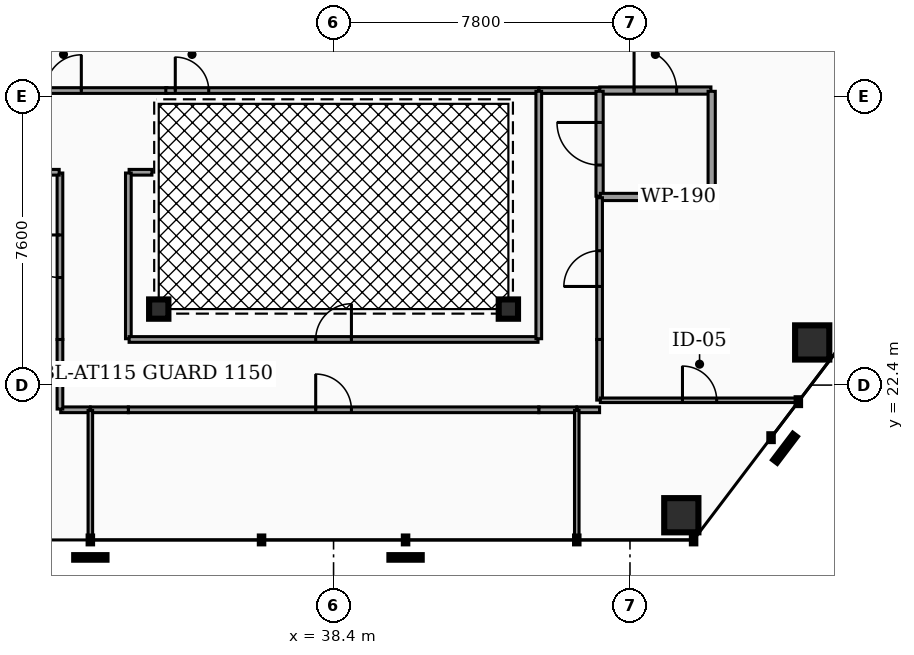
"""IFC4 building model, lengths in metres.
Left out: names, types, materials, properties, quantities, classifications, styles, units other than length and angle.
Written with IfcOpenShell. Run it as: python <this file> out.ifc"""

import sys

from ifc_helpers import new_model, si_unit, direction, frame, frame_2d, origin, origin_2d, place, context, subcontext, project, spatial, rectangle, hollow_rectangle, hollow_circle, extrude, element, fill, save


model = new_model("IFC4")
c1 = context("Model", 3, precision=1e-05, world=origin(), true_north=direction((0.0, 1.0)))
c2 = subcontext(c1, "Body", "Model", "MODEL_VIEW")
j1 = project(units=[si_unit("LENGTHUNIT", "METRE"), si_unit("PLANEANGLEUNIT", "RADIAN")], contexts=[c1])
p1 = place(None, origin())
s1 = spatial("IfcSite", under=j1, at=p1, CompositionType="ELEMENT")
p2 = place(p1, origin())
s2 = spatial("IfcBuilding", under=s1, at=p2, CompositionType="ELEMENT")
p3 = place(p2, frame((0.0, 0.0, 100.98)))
s3 = spatial("IfcBuildingStorey", under=s2, at=p3, CompositionType="ELEMENT", Elevation=100.98)
for number, where, z_axis, x_axis in (
    (1, (47.551, 18.976, 0.0), (0.0, 0.0, 1.0), (1.0, 0.0, 0.0)),
    (2, (50.995, 23.522, 0.0), (0.0, 0.0, 1.0), (1.0, 0.0, 0.0)),
):
    element("IfcColumn", number, at=place(p3, frame(where, z_axis=z_axis, x_axis=x_axis)), inside=s3, PredefinedType="COLUMN", context=c2, shape_type="SweptSolid", body=[
        extrude(hollow_rectangle(XDim=0.9, YDim=0.9, WallThickness=0.045, at=origin_2d()), origin(), (0.0, 0.0, 1.0), 3.82),
    ])
for number, where, z_axis, x_axis in (
    (3, (33.8, 24.4, 0.0), (0.0, 0.0, 1.0), (1.0, 0.0, 0.0)),
    (4, (43.0, 24.4, 0.0), (0.0, 0.0, 1.0), (1.0, 0.0, 0.0)),
):
    element("IfcColumn", number, at=place(p3, frame(where, z_axis=z_axis, x_axis=x_axis)), inside=s3, PredefinedType="COLUMN", context=c2, shape_type="SweptSolid", body=[
        extrude(hollow_circle(Radius=0.254, WallThickness=0.02, at=origin_2d()), origin(), (0.0, 0.0, 1.0), 3.82),
    ])
p4 = place(p3, frame((45.405, 30.15, 0.0), z_axis=(0.0, 0.0, 1.0), x_axis=(1.0, 0.0, 0.0)))
e5 = element("IfcWall", 5, at=p4, inside=s3, PredefinedType="PARTITIONING", context=c2, shape_type="SweptSolid", body=[
    extrude(rectangle(XDim=2.925, YDim=0.19, at=frame_2d((1.462, 0.0))), origin(), (0.0, 0.0, 1.0), 2.777),
])
p5 = place(p4, frame((0.903, 0.0, 0.0)))
e6 = element("IfcOpeningElement", 6, at=p5, cuts=e5, PredefinedType="OPENING", context=c2, shape_type="SweptSolid", body=[
    extrude(rectangle(XDim=1.12, YDim=2.05, at=frame_2d((0.56, 1.025))), frame((0.0, 0.105, 0.0), z_axis=(0.0, -1.0, 0.0), x_axis=(1.0, 0.0, 0.0)), (0.0, 0.0, 1.0), 0.21),
])
p6 = place(p3, frame((43.805, 30.15, 0.0), z_axis=(0.0, 0.0, 1.0), x_axis=(1.0, 0.0, 0.0)))
e7 = element("IfcWall", 7, at=p6, inside=s3, PredefinedType="PARTITIONING", context=c2, shape_type="SweptSolid", body=[
    extrude(rectangle(XDim=1.59, YDim=0.15, at=frame_2d((0.795, 0.0))), origin(), (0.0, 0.0, 1.0), 2.777),
])
p7 = place(p3, frame((28.57, 30.15, 0.0), z_axis=(0.0, 0.0, 1.0), x_axis=(1.0, 0.0, 0.0)))
e8 = element("IfcWall", 8, at=p7, inside=s3, PredefinedType="PARTITIONING", context=c2, shape_type="SweptSolid", body=[
    extrude(rectangle(XDim=5.445, YDim=0.15, at=frame_2d((2.722, 0.0))), origin(), (0.0, 0.0, 1.0), 2.777),
])
p8 = place(p7, frame((2.252, 0.0, 0.0)))
e9 = element("IfcOpeningElement", 9, at=p8, cuts=e8, PredefinedType="OPENING", context=c2, shape_type="SweptSolid", body=[
    extrude(rectangle(XDim=0.94, YDim=2.05, at=frame_2d((0.47, 1.025))), frame((0.0, 0.085, 0.0), z_axis=(0.0, -1.0, 0.0), x_axis=(1.0, 0.0, 0.0)), (0.0, 0.0, 1.0), 0.17),
])
p9 = place(p3, frame((33.985, 30.15, 0.0), z_axis=(0.0, 0.0, 1.0), x_axis=(1.0, 0.0, 0.0)))
e10 = element("IfcWall", 10, at=p9, inside=s3, PredefinedType="PARTITIONING", context=c2, shape_type="SweptSolid", body=[
    extrude(rectangle(XDim=9.81, YDim=0.15, at=frame_2d((4.905, 0.0))), origin(), (0.0, 0.0, 1.0), 2.777),
])
p10 = place(p9, frame((0.25, 0.0, 0.0)))
e11 = element("IfcOpeningElement", 11, at=p10, cuts=e10, PredefinedType="OPENING", context=c2, shape_type="SweptSolid", body=[
    extrude(rectangle(XDim=0.88, YDim=2.05, at=frame_2d((0.44, 1.025))), frame((0.0, 0.085, 0.0), z_axis=(0.0, -1.0, 0.0), x_axis=(1.0, 0.0, 0.0)), (0.0, 0.0, 1.0), 0.17),
])
p11 = place(p3, frame((45.4, 27.37, 0.0), z_axis=(0.0, 0.0, 1.0), x_axis=(0.0, 1.0, 0.0)))
e12 = element("IfcWall", 12, at=p11, inside=s3, PredefinedType="PARTITIONING", context=c2, shape_type="SweptSolid", body=[
    extrude(rectangle(XDim=2.76, YDim=0.19, at=frame_2d((1.38, 0.0))), origin(), (0.0, 0.0, 1.0), 2.777),
])
p12 = place(p11, frame((0.82, 0.0, 0.0)))
e13 = element("IfcOpeningElement", 13, at=p12, cuts=e12, PredefinedType="OPENING", context=c2, shape_type="SweptSolid", body=[
    extrude(rectangle(XDim=1.12, YDim=2.05, at=frame_2d((0.56, 1.025))), frame((0.0, 0.105, 0.0), z_axis=(0.0, -1.0, 0.0), x_axis=(1.0, 0.0, 0.0)), (0.0, 0.0, 1.0), 0.21),
])
p13 = place(p3, frame((45.42, 27.35, 0.0), z_axis=(0.0, 0.0, 1.0), x_axis=(1.0, 0.0, 0.0)))
e14 = element("IfcWall", 14, at=p13, inside=s3, PredefinedType="PARTITIONING", context=c2, shape_type="SweptSolid", body=[
    extrude(rectangle(XDim=2.91, YDim=0.19, at=frame_2d((1.455, 0.0))), origin(), (0.0, 0.0, 1.0), 2.777),
])
p14 = place(p3, frame((48.35, 27.37, 0.0), z_axis=(0.0, 0.0, 1.0), x_axis=(0.0, 1.0, 0.0)))
e15 = element("IfcWall", 15, at=p14, inside=s3, PredefinedType="PARTITIONING", context=c2, shape_type="SweptSolid", body=[
    extrude(rectangle(XDim=2.76, YDim=0.19, at=frame_2d((1.38, 0.0))), origin(), (0.0, 0.0, 1.0), 2.777),
])
p15 = place(p3, frame((43.8, 21.75, 0.0), z_axis=(0.0, 0.0, 1.0), x_axis=(1.0, 0.0, 0.0)))
e16 = element("IfcWall", 16, at=p15, inside=s3, PredefinedType="PARTITIONING", context=c2, shape_type="SweptSolid", body=[
    extrude(rectangle(XDim=0.995, YDim=0.15, at=frame_2d((0.498, 0.0))), origin(), (0.0, 0.0, 1.0), 2.777),
])
p16 = place(p3, frame((33.0, 21.75, 0.0), z_axis=(0.0, 0.0, 1.0), x_axis=(1.0, 0.0, 0.0)))
e17 = element("IfcWall", 17, at=p16, inside=s3, PredefinedType="PARTITIONING", context=c2, shape_type="SweptSolid", body=[
    extrude(rectangle(XDim=10.8, YDim=0.15, at=frame_2d((5.4, 0.0))), origin(), (0.0, 0.0, 1.0), 2.777),
])
p17 = place(p16, frame((4.93, 0.0, 0.0)))
e18 = element("IfcOpeningElement", 18, at=p17, cuts=e17, PredefinedType="OPENING", context=c2, shape_type="SweptSolid", body=[
    extrude(rectangle(XDim=0.94, YDim=2.05, at=frame_2d((0.47, 1.025))), frame((0.0, 0.085, 0.0), z_axis=(0.0, -1.0, 0.0), x_axis=(1.0, 0.0, 0.0)), (0.0, 0.0, 1.0), 0.17),
])
p18 = place(p3, frame((32.005, 21.75, 0.0), z_axis=(0.0, 0.0, 1.0), x_axis=(1.0, 0.0, 0.0)))
e19 = element("IfcWall", 19, at=p18, inside=s3, PredefinedType="PARTITIONING", context=c2, shape_type="SweptSolid", body=[
    extrude(rectangle(XDim=0.995, YDim=0.15, at=frame_2d((0.498, 0.0))), origin(), (0.0, 0.0, 1.0), 2.777),
])
p19 = place(p3, frame((44.805, 21.75, 0.0), z_axis=(0.0, 0.0, 1.0), x_axis=(1.0, 0.0, 0.0)))
e20 = element("IfcWall", 20, at=p19, inside=s3, PredefinedType="PARTITIONING", context=c2, shape_type="SweptSolid", body=[
    extrude(rectangle(XDim=0.595, YDim=0.15, at=frame_2d((0.297, 0.0))), origin(), (0.0, 0.0, 1.0), 2.777),
])
p20 = place(p3, frame((31.22, 21.75, 0.0), z_axis=(0.0, 0.0, 1.0), x_axis=(1.0, 0.0, 0.0)))
e21 = element("IfcWall", 21, at=p20, inside=s3, PredefinedType="PARTITIONING", context=c2, shape_type="SweptSolid", body=[
    extrude(rectangle(XDim=0.775, YDim=0.15, at=frame_2d((0.388, 0.0))), origin(), (0.0, 0.0, 1.0), 2.777),
])
p21 = place(p3, frame((31.2, 21.77, 0.0), z_axis=(0.0, 0.0, 1.0), x_axis=(0.0, 1.0, 0.0)))
e22 = element("IfcWall", 22, at=p21, inside=s3, PredefinedType="PARTITIONING", context=c2, shape_type="SweptSolid", body=[
    extrude(rectangle(XDim=1.83, YDim=0.15, at=frame_2d((0.915, 0.0))), origin(), (0.0, 0.0, 1.0), 2.777),
])
p22 = place(p3, frame((31.2, 23.6, 0.0), z_axis=(0.0, 0.0, 1.0), x_axis=(0.0, 1.0, 0.0)))
e23 = element("IfcWall", 23, at=p22, inside=s3, PredefinedType="PARTITIONING", context=c2, shape_type="SweptSolid", body=[
    extrude(rectangle(XDim=4.38, YDim=0.15, at=frame_2d((2.19, 0.0))), origin(), (0.0, 0.0, 1.0), 2.777),
])
p23 = place(p22, frame((1.63, 0.0, 0.0)))
e24 = element("IfcOpeningElement", 24, at=p23, cuts=e23, PredefinedType="OPENING", context=c2, shape_type="SweptSolid", body=[
    extrude(rectangle(XDim=1.12, YDim=2.05, at=frame_2d((0.56, 1.025))), frame((0.0, 0.085, 0.0), z_axis=(0.0, -1.0, 0.0), x_axis=(1.0, 0.0, 0.0)), (0.0, 0.0, 1.0), 0.17),
])
p24 = place(p3, frame((28.55, 28.0, 0.0), z_axis=(0.0, 0.0, 1.0), x_axis=(1.0, 0.0, 0.0)))
e25 = element("IfcWall", 25, at=p24, inside=s3, PredefinedType="PARTITIONING", context=c2, shape_type="SweptSolid", body=[
    extrude(rectangle(XDim=2.63, YDim=0.15, at=frame_2d((1.315, 0.0))), origin(), (0.0, 0.0, 1.0), 2.777),
])
p25 = place(p3, frame((45.4, 23.6, 0.0), z_axis=(0.0, 0.0, 1.0), x_axis=(0.0, 1.0, 0.0)))
e26 = element("IfcWall", 26, at=p25, inside=s3, PredefinedType="PARTITIONING", context=c2, shape_type="SweptSolid", body=[
    extrude(rectangle(XDim=3.73, YDim=0.15, at=frame_2d((1.865, 0.0))), origin(), (0.0, 0.0, 1.0), 2.777),
])
p26 = place(p25, frame((1.395, 0.0, 0.0)))
e27 = element("IfcOpeningElement", 27, at=p26, cuts=e26, PredefinedType="OPENING", context=c2, shape_type="SweptSolid", body=[
    extrude(rectangle(XDim=0.94, YDim=2.05, at=frame_2d((0.47, 1.025))), frame((0.0, 0.085, 0.0), z_axis=(0.0, -1.0, 0.0), x_axis=(1.0, 0.0, 0.0)), (0.0, 0.0, 1.0), 0.17),
])
p27 = place(p3, frame((45.4, 22.005, 0.0), z_axis=(0.0, 0.0, 1.0), x_axis=(0.0, 1.0, 0.0)))
e28 = element("IfcWall", 28, at=p27, inside=s3, PredefinedType="PARTITIONING", context=c2, shape_type="SweptSolid", body=[
    extrude(rectangle(XDim=1.595, YDim=0.15, at=frame_2d((0.798, 0.0))), origin(), (0.0, 0.0, 1.0), 2.777),
])
p28 = place(p3, frame((33.02, 28.0, 0.0), z_axis=(0.0, 0.0, 1.0), x_axis=(1.0, 0.0, 0.0)))
e29 = element("IfcWall", 29, at=p28, inside=s3, PredefinedType="PARTITIONING", context=c2, shape_type="SweptSolid", body=[
    extrude(rectangle(XDim=0.6, YDim=0.15, at=frame_2d((0.3, 0.0))), origin(), (0.0, 0.0, 1.0), 2.777),
])
p29 = place(p3, frame((33.0, 23.62, 0.0), z_axis=(0.0, 0.0, 1.0), x_axis=(0.0, 1.0, 0.0)))
e30 = element("IfcWall", 30, at=p29, inside=s3, PredefinedType="PARTITIONING", context=c2, shape_type="SweptSolid", body=[
    extrude(rectangle(XDim=4.36, YDim=0.15, at=frame_2d((2.18, 0.0))), origin(), (0.0, 0.0, 1.0), 2.777),
])
p30 = place(p3, frame((33.02, 23.6, 0.0), z_axis=(0.0, 0.0, 1.0), x_axis=(1.0, 0.0, 0.0)))
e31 = element("IfcWall", 31, at=p30, inside=s3, PredefinedType="PARTITIONING", context=c2, shape_type="SweptSolid", body=[
    extrude(rectangle(XDim=10.76, YDim=0.15, at=frame_2d((5.38, 0.0))), origin(), (0.0, 0.0, 1.0), 2.777),
])
p31 = place(p30, frame((4.91, 0.0, 0.0)))
e32 = element("IfcOpeningElement", 32, at=p31, cuts=e31, PredefinedType="OPENING", context=c2, shape_type="SweptSolid", body=[
    extrude(rectangle(XDim=0.94, YDim=2.05, at=frame_2d((0.47, 1.025))), frame((0.0, 0.085, 0.0), z_axis=(0.0, -1.0, 0.0), x_axis=(1.0, 0.0, 0.0)), (0.0, 0.0, 1.0), 0.17),
])
p32 = place(p3, frame((43.8, 23.62, 0.0), z_axis=(0.0, 0.0, 1.0), x_axis=(0.0, 1.0, 0.0)))
e33 = element("IfcWall", 33, at=p32, inside=s3, PredefinedType="PARTITIONING", context=c2, shape_type="SweptSolid", body=[
    extrude(rectangle(XDim=6.51, YDim=0.15, at=frame_2d((3.255, 0.0))), origin(), (0.0, 0.0, 1.0), 2.777),
])
for number, where, z_axis, x_axis in (
    (34, (44.8, 18.341, 0.0), (0.0, 0.0, 1.0), (0.0, 1.0, 0.0)),
    (35, (32.0, 18.341, 0.0), (0.0, 0.0, 1.0), (0.0, 1.0, 0.0)),
):
    element("IfcWall", number, at=place(p3, frame(where, z_axis=z_axis, x_axis=x_axis)), inside=s3, PredefinedType="PARTITIONING", context=c2, shape_type="SweptSolid", body=[
        extrude(rectangle(XDim=3.389, YDim=0.12, at=frame_2d((1.695, 0.0))), origin(), (0.0, 0.0, 1.0), 2.777),
    ])
p33 = place(p3, frame((45.42, 22.0, 0.0), z_axis=(0.0, 0.0, 1.0), x_axis=(1.0, 0.0, 0.0)))
e36 = element("IfcWall", 36, at=p33, inside=s3, PredefinedType="PARTITIONING", context=c2, shape_type="SweptSolid", body=[
    extrude(rectangle(XDim=5.223, YDim=0.12, at=frame_2d((2.611, 0.0))), origin(), (0.0, 0.0, 1.0), 2.777),
])
p34 = place(p33, frame((2.161, 0.0, 0.0)))
e37 = element("IfcOpeningElement", 37, at=p34, cuts=e36, PredefinedType="OPENING", context=c2, shape_type="SweptSolid", body=[
    extrude(rectangle(XDim=0.9, YDim=2.05, at=frame_2d((0.45, 1.025))), frame((0.0, 0.07, 0.0), z_axis=(0.0, -1.0, 0.0), x_axis=(1.0, 0.0, 0.0)), (0.0, 0.0, 1.0), 0.14),
])
p35 = place(p5, origin())
e38 = element("IfcDoor", 38, at=p35, inside=s3, OperationType="SINGLE_SWING_LEFT", PredefinedType="DOOR", context=c2, shape_type="SweptSolid", body=[
    extrude(rectangle(XDim=1.12, YDim=2.05, at=frame_2d((0.56, 1.025))), frame((0.0, 0.025, 0.0), z_axis=(0.0, -1.0, 0.0), x_axis=(1.0, 0.0, 0.0)), (0.0, 0.0, 1.0), 0.05),
])
fill(e6, e38)
p36 = place(p8, origin())
e39 = element("IfcDoor", 39, at=p36, inside=s3, OperationType="SINGLE_SWING_RIGHT", PredefinedType="DOOR", context=c2, shape_type="SweptSolid", body=[
    extrude(rectangle(XDim=0.94, YDim=2.05, at=frame_2d((0.47, 1.025))), frame((0.0, 0.025, 0.0), z_axis=(0.0, -1.0, 0.0), x_axis=(1.0, 0.0, 0.0)), (0.0, 0.0, 1.0), 0.05),
])
fill(e9, e39)
p37 = place(p10, origin())
e40 = element("IfcDoor", 40, at=p37, inside=s3, OperationType="SINGLE_SWING_LEFT", PredefinedType="DOOR", context=c2, shape_type="SweptSolid", body=[
    extrude(rectangle(XDim=0.88, YDim=2.05, at=frame_2d((0.44, 1.025))), frame((0.0, 0.025, 0.0), z_axis=(0.0, -1.0, 0.0), x_axis=(1.0, 0.0, 0.0)), (0.0, 0.0, 1.0), 0.05),
])
fill(e11, e40)
p38 = place(p12, origin())
e41 = element("IfcDoor", 41, at=p38, inside=s3, OperationType="SINGLE_SWING_RIGHT", PredefinedType="DOOR", context=c2, shape_type="SweptSolid", body=[
    extrude(rectangle(XDim=1.12, YDim=2.05, at=frame_2d((0.56, 1.025))), frame((0.0, 0.025, 0.0), z_axis=(0.0, -1.0, 0.0), x_axis=(1.0, 0.0, 0.0)), (0.0, 0.0, 1.0), 0.05),
])
fill(e13, e41)
p39 = place(p17, origin())
e42 = element("IfcDoor", 42, at=p39, inside=s3, OperationType="SINGLE_SWING_LEFT", PredefinedType="DOOR", context=c2, shape_type="SweptSolid", body=[
    extrude(rectangle(XDim=0.94, YDim=2.05, at=frame_2d((0.47, 1.025))), frame((0.0, 0.025, 0.0), z_axis=(0.0, -1.0, 0.0), x_axis=(1.0, 0.0, 0.0)), (0.0, 0.0, 1.0), 0.05),
])
fill(e18, e42)
p40 = place(p23, origin())
e43 = element("IfcDoor", 43, at=p40, inside=s3, OperationType="SINGLE_SWING_RIGHT", PredefinedType="DOOR", context=c2, shape_type="SweptSolid", body=[
    extrude(rectangle(XDim=1.12, YDim=2.05, at=frame_2d((0.56, 1.025))), frame((0.0, 0.025, 0.0), z_axis=(0.0, -1.0, 0.0), x_axis=(1.0, 0.0, 0.0)), (0.0, 0.0, 1.0), 0.05),
])
fill(e24, e43)
p41 = place(p26, origin())
e44 = element("IfcDoor", 44, at=p41, inside=s3, OperationType="SINGLE_SWING_LEFT", PredefinedType="DOOR", context=c2, shape_type="SweptSolid", body=[
    extrude(rectangle(XDim=0.94, YDim=2.05, at=frame_2d((0.47, 1.025))), frame((0.0, 0.025, 0.0), z_axis=(0.0, -1.0, 0.0), x_axis=(1.0, 0.0, 0.0)), (0.0, 0.0, 1.0), 0.05),
])
fill(e27, e44)
p42 = place(p31, origin())
e45 = element("IfcDoor", 45, at=p42, inside=s3, OperationType="SINGLE_SWING_RIGHT", PredefinedType="DOOR", context=c2, shape_type="SweptSolid", body=[
    extrude(rectangle(XDim=0.94, YDim=2.05, at=frame_2d((0.47, 1.025))), frame((0.0, 0.025, 0.0), z_axis=(0.0, -1.0, 0.0), x_axis=(1.0, 0.0, 0.0)), (0.0, 0.0, 1.0), 0.05),
])
fill(e32, e45)
p43 = place(p34, origin())
e46 = element("IfcDoor", 46, at=p43, inside=s3, OperationType="SINGLE_SWING_LEFT", PredefinedType="DOOR", context=c2, shape_type="SweptSolid", body=[
    extrude(rectangle(XDim=0.9, YDim=2.05, at=frame_2d((0.45, 1.025))), frame((0.0, 0.025, 0.0), z_axis=(0.0, -1.0, 0.0), x_axis=(1.0, 0.0, 0.0)), (0.0, 0.0, 1.0), 0.05),
])
fill(e37, e46)
save(model, sys.argv[1])
